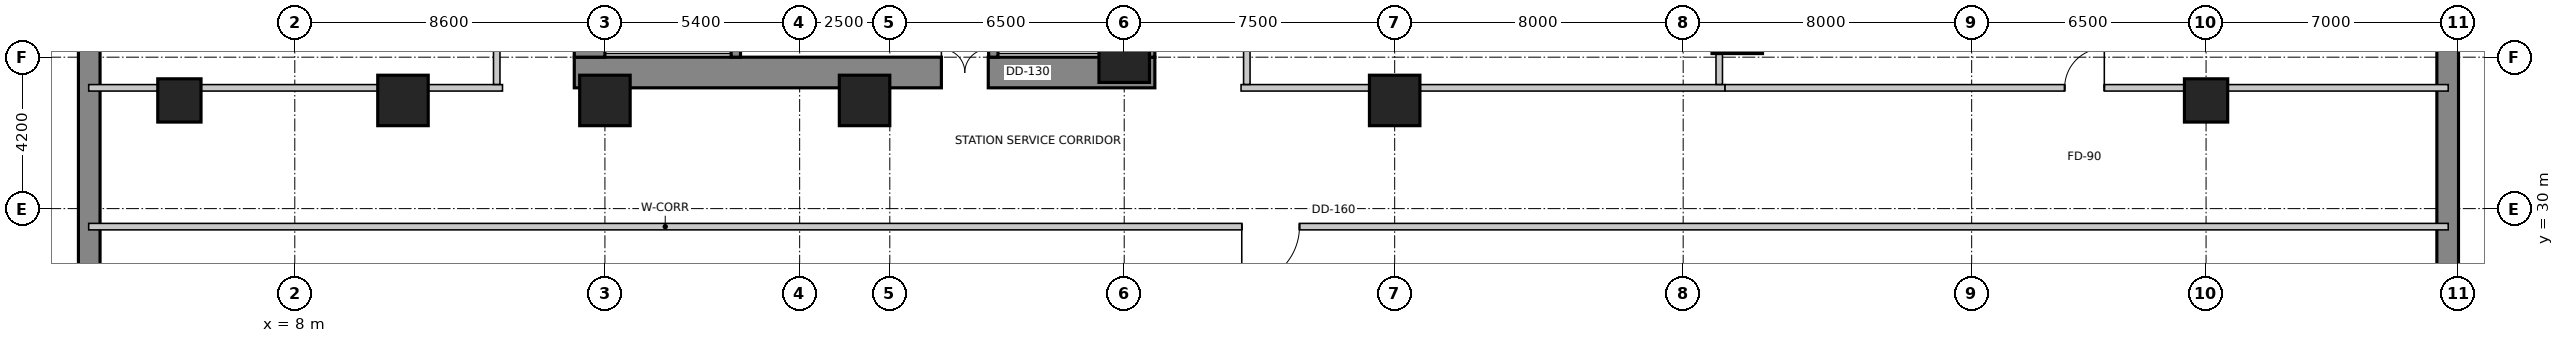
"""IFC4 building model, lengths in metres.
Left out: names, types, materials, properties, quantities, classifications, styles, units other than length and angle.
Written with IfcOpenShell. Run it as: python <this file> out.ifc"""

import sys

from ifc_helpers import new_model, si_unit, direction, frame, frame_2d, origin, origin_2d, place, context, subcontext, project, spatial, rectangle, extrude, source, transform, mapped, element, fill, save


model = new_model("IFC4")
c1 = context("Model", 3, precision=1e-05, world=origin(), true_north=direction((0.0, 1.0)))
c2 = subcontext(c1, "Body", "Model", "MODEL_VIEW")
j1 = project(units=[si_unit("LENGTHUNIT", "METRE"), si_unit("PLANEANGLEUNIT", "RADIAN")], contexts=[c1])
p1 = place(None, origin())
s1 = spatial("IfcSite", under=j1, at=p1, CompositionType="ELEMENT")
p2 = place(p1, origin())
s2 = spatial("IfcBuilding", under=s1, at=p2, CompositionType="ELEMENT")
p3 = place(p2, frame((0.0, 0.0, -11.2)))
s3 = spatial("IfcBuildingStorey", under=s2, at=p3, CompositionType="ELEMENT", Elevation=-11.2)
p4 = place(p3, frame((15.75, 33.775, 0.0), z_axis=(0.0, 0.0, 1.0), x_axis=(1.0, 0.0, 0.0)))
e1 = element("IfcWall", 1, at=p4, inside=s3, PredefinedType="SHEAR", context=c2, shape_type="SweptSolid", body=[
    extrude(rectangle(XDim=16.1, YDim=0.85, at=frame_2d((8.05, 0.0))), origin(), (0.0, 0.0, 1.0), 5.8),
])
m1 = source(origin(), c2, "Body", "SweptSolid", [
    extrude(rectangle(XDim=1.3, YDim=2.15, at=frame_2d((0.65, 1.075))), frame((0.0, 0.435, 0.0), z_axis=(0.0, -1.0, 0.0), x_axis=(1.0, 0.0, 0.0)), (0.0, 0.0, 1.0), 0.87),
])
p5 = place(p4, frame((10.18, 0.0, 0.0)))
e2 = element("IfcOpeningElement", 2, at=p5, cuts=e1, PredefinedType="OPENING", context=c2, shape_type="MappedRepresentation", body=[
    mapped(m1, transform((0.0, 0.0, 0.0), scale=1.0)),
])
p6 = place(p3, frame((16.175, 34.2, 0.0), z_axis=(0.0, 0.0, 1.0), x_axis=(0.0, 1.0, 0.0)))
e3 = element("IfcWall", 3, at=p6, inside=s3, PredefinedType="SHEAR", context=c2, shape_type="SweptSolid", body=[
    extrude(rectangle(XDim=11.4, YDim=0.85, at=frame_2d((5.7, 0.0))), origin(), (0.0, 0.0, 1.0), 5.8),
])
m2 = source(origin(), c2, "Body", "SweptSolid", [
    extrude(rectangle(XDim=1.1, YDim=2.15, at=frame_2d((0.55, 1.075))), frame((0.0, 0.435, 0.0), z_axis=(0.0, -1.0, 0.0), x_axis=(1.0, 0.0, 0.0)), (0.0, 0.0, 1.0), 0.87),
])
p7 = place(p6, frame((7.15, 0.0, 0.0)))
e4 = element("IfcOpeningElement", 4, at=p7, cuts=e3, PredefinedType="OPENING", context=c2, shape_type="MappedRepresentation", body=[
    mapped(m2, transform((0.0, 0.0, 0.0), scale=1.0)),
])
p8 = place(p3, frame((31.425, 34.2, 0.0), z_axis=(0.0, 0.0, 1.0), x_axis=(0.0, 1.0, 0.0)))
e5 = element("IfcWall", 5, at=p8, inside=s3, PredefinedType="SHEAR", context=c2, shape_type="SweptSolid", body=[
    extrude(rectangle(XDim=11.4, YDim=0.85, at=frame_2d((5.7, 0.0))), origin(), (0.0, 0.0, 1.0), 5.8),
])
p9 = place(p8, frame((7.35, 0.0, 0.0)))
e6 = element("IfcOpeningElement", 6, at=p9, cuts=e5, PredefinedType="OPENING", context=c2, shape_type="MappedRepresentation", body=[
    mapped(m2, transform((0.0, 0.0, 0.0), scale=1.0)),
])
p10 = place(p3, frame((20.23, 34.2, 0.0), z_axis=(0.0, 0.0, 1.0), x_axis=(0.0, 1.0, 0.0)))
e7 = element("IfcWall", 7, at=p10, inside=s3, PredefinedType="SHEAR", context=c2, shape_type="SweptSolid", body=[
    extrude(rectangle(XDim=9.06, YDim=0.26, at=frame_2d((4.53, 0.0))), origin(), (0.0, 0.0, 1.0), 5.8),
])
m3 = source(origin(), c2, "Body", "SweptSolid", [
    extrude(rectangle(XDim=1.1, YDim=2.15, at=frame_2d((0.55, 1.075))), frame((0.0, 0.14, 0.0), z_axis=(0.0, -1.0, 0.0), x_axis=(1.0, 0.0, 0.0)), (0.0, 0.0, 1.0), 0.28),
])
p11 = place(p10, frame((7.45, 0.0, 0.0)))
e8 = element("IfcOpeningElement", 8, at=p11, cuts=e7, PredefinedType="OPENING", context=c2, shape_type="MappedRepresentation", body=[
    mapped(m3, transform((0.0, 0.0, 0.0), scale=1.0)),
])
p12 = place(p3, frame((27.37, 34.2, 0.0), z_axis=(0.0, 0.0, 1.0), x_axis=(0.0, 1.0, 0.0)))
e9 = element("IfcWall", 9, at=p12, inside=s3, PredefinedType="SHEAR", context=c2, shape_type="SweptSolid", body=[
    extrude(rectangle(XDim=9.06, YDim=0.26, at=frame_2d((4.53, 0.0))), origin(), (0.0, 0.0, 1.0), 5.8),
])
p13 = place(p12, frame((7.45, 0.0, 0.0)))
e10 = element("IfcOpeningElement", 10, at=p13, cuts=e9, PredefinedType="OPENING", context=c2, shape_type="MappedRepresentation", body=[
    mapped(m3, transform((0.0, 0.0, 0.0), scale=1.0)),
])
for number, where, z_axis, x_axis in (
    (11, (67.7, 4.5, 0.0), (0.0, 0.0, 1.0), (0.0, 1.0, 0.0)),
    (12, (2.3, 49.5, 0.0), (0.0, 0.0, 1.0), (0.0, -1.0, 0.0)),
):
    element("IfcWall", number, at=place(p3, frame(where, z_axis=z_axis, x_axis=x_axis)), inside=s3, PredefinedType="SHEAR", context=c2, shape_type="SweptSolid", body=[
        extrude(rectangle(XDim=45.0, YDim=0.6, at=frame_2d((22.5, 0.0))), origin(), (0.0, 0.0, 1.0), 5.8),
    ])
m4 = source(origin(), c2, "Body", "SweptSolid", [
    extrude(rectangle(XDim=1.2, YDim=1.2, at=origin_2d()), origin(), (0.0, 0.0, 1.0), 5.8),
])
p14 = place(p3, frame((4.8, 33.0, 0.0), z_axis=(0.0, 0.0, 1.0), x_axis=(1.0, 0.0, 0.0)))
e13 = element("IfcColumn", 13, at=p14, inside=s3, PredefinedType="COLUMN", context=c2, shape_type="MappedRepresentation", body=[
    mapped(m4, transform((0.0, 0.0, 0.0), scale=1.0)),
])
m5 = source(origin(), c2, "Body", "SweptSolid", [
    extrude(rectangle(XDim=1.4, YDim=1.4, at=origin_2d()), origin(), (0.0, 0.0, 1.0), 5.8),
])
for number, where, z_axis, x_axis in (
    (14, (11.0, 33.0, 0.0), (0.0, 0.0, 1.0), (1.0, 0.0, 0.0)),
    (15, (16.6, 33.0, 0.0), (0.0, 0.0, 1.0), (1.0, 0.0, 0.0)),
    (16, (23.8, 33.0, 0.0), (0.0, 0.0, 1.0), (1.0, 0.0, 0.0)),
    (17, (31.0, 34.2, 0.0), (0.0, 0.0, 1.0), (1.0, 0.0, 0.0)),
    (18, (38.5, 33.0, 0.0), (0.0, 0.0, 1.0), (1.0, 0.0, 0.0)),
    (19, (48.0, 35.0, 0.0), (0.0, 0.0, 1.0), (1.0, 0.0, 0.0)),
):
    element("IfcColumn", number, at=place(p3, frame(where, z_axis=z_axis, x_axis=x_axis)), inside=s3, PredefinedType="COLUMN", context=c2, shape_type="MappedRepresentation", body=[
        mapped(m5, transform((0.0, 0.0, 0.0), scale=1.0)),
    ])
p15 = place(p3, frame((61.0, 33.0, 0.0), z_axis=(0.0, 0.0, 1.0), x_axis=(1.0, 0.0, 0.0)))
e20 = element("IfcColumn", 20, at=p15, inside=s3, PredefinedType="COLUMN", context=c2, shape_type="MappedRepresentation", body=[
    mapped(m4, transform((0.0, 0.0, 0.0), scale=1.0)),
])
p16 = place(p3, frame((67.715, 29.5, 0.0), z_axis=(0.0, 0.0, 1.0), x_axis=(-1.0, 0.0, 0.0)))
e21 = element("IfcWall", 21, at=p16, inside=s3, PredefinedType="PARTITIONING", context=c2, shape_type="SweptSolid", body=[
    extrude(rectangle(XDim=65.43, YDim=0.18, at=frame_2d((32.715, 0.0))), origin(), (0.0, 0.0, 1.0), 3.672),
])
m6 = source(origin(), c2, "Body", "SweptSolid", [
    extrude(rectangle(XDim=1.6, YDim=2.15, at=frame_2d((0.8, 1.075))), frame((0.0, 0.1, 0.0), z_axis=(0.0, -1.0, 0.0), x_axis=(1.0, 0.0, 0.0)), (0.0, 0.0, 1.0), 0.2),
])
p17 = place(p16, frame((31.855, 0.0, 0.0)))
e22 = element("IfcOpeningElement", 22, at=p17, cuts=e21, PredefinedType="OPENING", context=c2, shape_type="MappedRepresentation", body=[
    mapped(m6, transform((0.0, 0.0, 0.0), scale=1.0)),
])
p18 = place(p3, frame((34.24, 33.35, 0.0), z_axis=(0.0, 0.0, 1.0), x_axis=(1.0, 0.0, 0.0)))
e23 = element("IfcWall", 23, at=p18, inside=s3, PredefinedType="PARTITIONING", context=c2, shape_type="SweptSolid", body=[
    extrude(rectangle(XDim=13.42, YDim=0.18, at=frame_2d((6.71, 0.0))), origin(), (0.0, 0.0, 1.0), 3.672),
])
p19 = place(p3, frame((47.662, 33.35, 0.0), z_axis=(0.0, 0.0, 1.0), x_axis=(1.0, 0.0, 0.0)))
e24 = element("IfcWall", 24, at=p19, inside=s3, PredefinedType="PARTITIONING", context=c2, shape_type="SweptSolid", body=[
    extrude(rectangle(XDim=20.053, YDim=0.18, at=frame_2d((10.026, 0.0))), origin(), (0.0, 0.0, 1.0), 3.672),
])
m7 = source(origin(), c2, "Body", "SweptSolid", [
    extrude(rectangle(XDim=1.1, YDim=2.15, at=frame_2d((0.55, 1.075))), frame((0.0, 0.1, 0.0), z_axis=(0.0, -1.0, 0.0), x_axis=(1.0, 0.0, 0.0)), (0.0, 0.0, 1.0), 0.2),
])
p20 = place(p19, frame((9.417, 0.0, 0.0)))
e25 = element("IfcOpeningElement", 25, at=p20, cuts=e24, PredefinedType="OPENING", context=c2, shape_type="MappedRepresentation", body=[
    mapped(m7, transform((0.0, 0.0, 0.0), scale=1.0)),
])
p21 = place(p3, frame((2.285, 33.35, 0.0), z_axis=(0.0, 0.0, 1.0), x_axis=(1.0, 0.0, 0.0)))
e26 = element("IfcWall", 26, at=p21, inside=s3, PredefinedType="PARTITIONING", context=c2, shape_type="SweptSolid", body=[
    extrude(rectangle(XDim=11.475, YDim=0.18, at=frame_2d((5.738, 0.0))), origin(), (0.0, 0.0, 1.0), 4.272),
])
p22 = place(p3, frame((13.6, 33.444, 0.0), z_axis=(0.0, 0.0, 1.0), x_axis=(0.0, 1.0, 0.0)))
e27 = element("IfcWall", 27, at=p22, inside=s3, PredefinedType="PARTITIONING", context=c2, shape_type="SweptSolid", body=[
    extrude(rectangle(XDim=14.556, YDim=0.18, at=frame_2d((7.278, 0.0))), origin(), (0.0, 0.0, 1.0), 4.522),
])
p23 = place(p22, frame((8.958, 0.0, 0.0)))
e28 = element("IfcOpeningElement", 28, at=p23, cuts=e27, PredefinedType="OPENING", context=c2, shape_type="MappedRepresentation", body=[
    mapped(m7, transform((0.0, 0.0, 0.0), scale=1.0)),
])
p24 = place(p3, frame((34.4, 48.0, 0.0), z_axis=(0.0, 0.0, 1.0), x_axis=(0.0, -1.0, 0.0)))
e29 = element("IfcWall", 29, at=p24, inside=s3, PredefinedType="PARTITIONING", context=c2, shape_type="SweptSolid", body=[
    extrude(rectangle(XDim=14.556, YDim=0.18, at=frame_2d((7.278, 0.0))), origin(), (0.0, 0.0, 1.0), 4.522),
])
p25 = place(p24, frame((6.668, 0.0, 0.0)))
e30 = element("IfcOpeningElement", 30, at=p25, cuts=e29, PredefinedType="OPENING", context=c2, shape_type="MappedRepresentation", body=[
    mapped(m7, transform((0.0, 0.0, 0.0), scale=1.0)),
])
p26 = place(p3, frame((47.5, 51.715, 0.0), z_axis=(0.0, 0.0, 1.0), x_axis=(0.0, -1.0, 0.0)))
e31 = element("IfcWall", 31, at=p26, inside=s3, PredefinedType="PARTITIONING", context=c2, shape_type="SweptSolid", body=[
    extrude(rectangle(XDim=18.271, YDim=0.18, at=frame_2d((9.135, 0.0))), origin(), (0.0, 0.0, 1.0), 3.672),
])
m8 = source(origin(), c2, "Body", "SweptSolid", [
    extrude(rectangle(XDim=1.3, YDim=2.15, at=frame_2d((0.65, 1.075))), frame((0.0, 0.025, 0.0), z_axis=(0.0, -1.0, 0.0), x_axis=(1.0, 0.0, 0.0)), (0.0, 0.0, 1.0), 0.05),
])
p27 = place(p5, origin())
e32 = element("IfcDoor", 32, at=p27, inside=s3, OperationType="DOUBLE_DOOR_SINGLE_SWING", PredefinedType="DOOR", context=c2, shape_type="MappedRepresentation", body=[
    mapped(m8, transform((0.0, 0.0, 0.0), scale=1.0)),
])
fill(e2, e32)
m9 = source(origin(), c2, "Body", "SweptSolid", [
    extrude(rectangle(XDim=1.6, YDim=2.15, at=frame_2d((0.8, 1.075))), frame((0.0, 0.025, 0.0), z_axis=(0.0, -1.0, 0.0), x_axis=(1.0, 0.0, 0.0)), (0.0, 0.0, 1.0), 0.05),
])
p28 = place(p17, origin())
e33 = element("IfcDoor", 33, at=p28, inside=s3, OperationType="SINGLE_SWING_RIGHT", PredefinedType="DOOR", context=c2, shape_type="MappedRepresentation", body=[
    mapped(m9, transform((0.0, 0.0, 0.0), scale=1.0)),
])
fill(e22, e33)
m10 = source(origin(), c2, "Body", "SweptSolid", [
    extrude(rectangle(XDim=1.1, YDim=2.15, at=frame_2d((0.55, 1.075))), frame((0.0, 0.025, 0.0), z_axis=(0.0, -1.0, 0.0), x_axis=(1.0, 0.0, 0.0)), (0.0, 0.0, 1.0), 0.05),
])
p29 = place(p20, origin())
e34 = element("IfcDoor", 34, at=p29, inside=s3, OperationType="SINGLE_SWING_RIGHT", PredefinedType="DOOR", context=c2, shape_type="MappedRepresentation", body=[
    mapped(m10, transform((0.0, 0.0, 0.0), scale=1.0)),
])
fill(e25, e34)
save(model, sys.argv[1])
